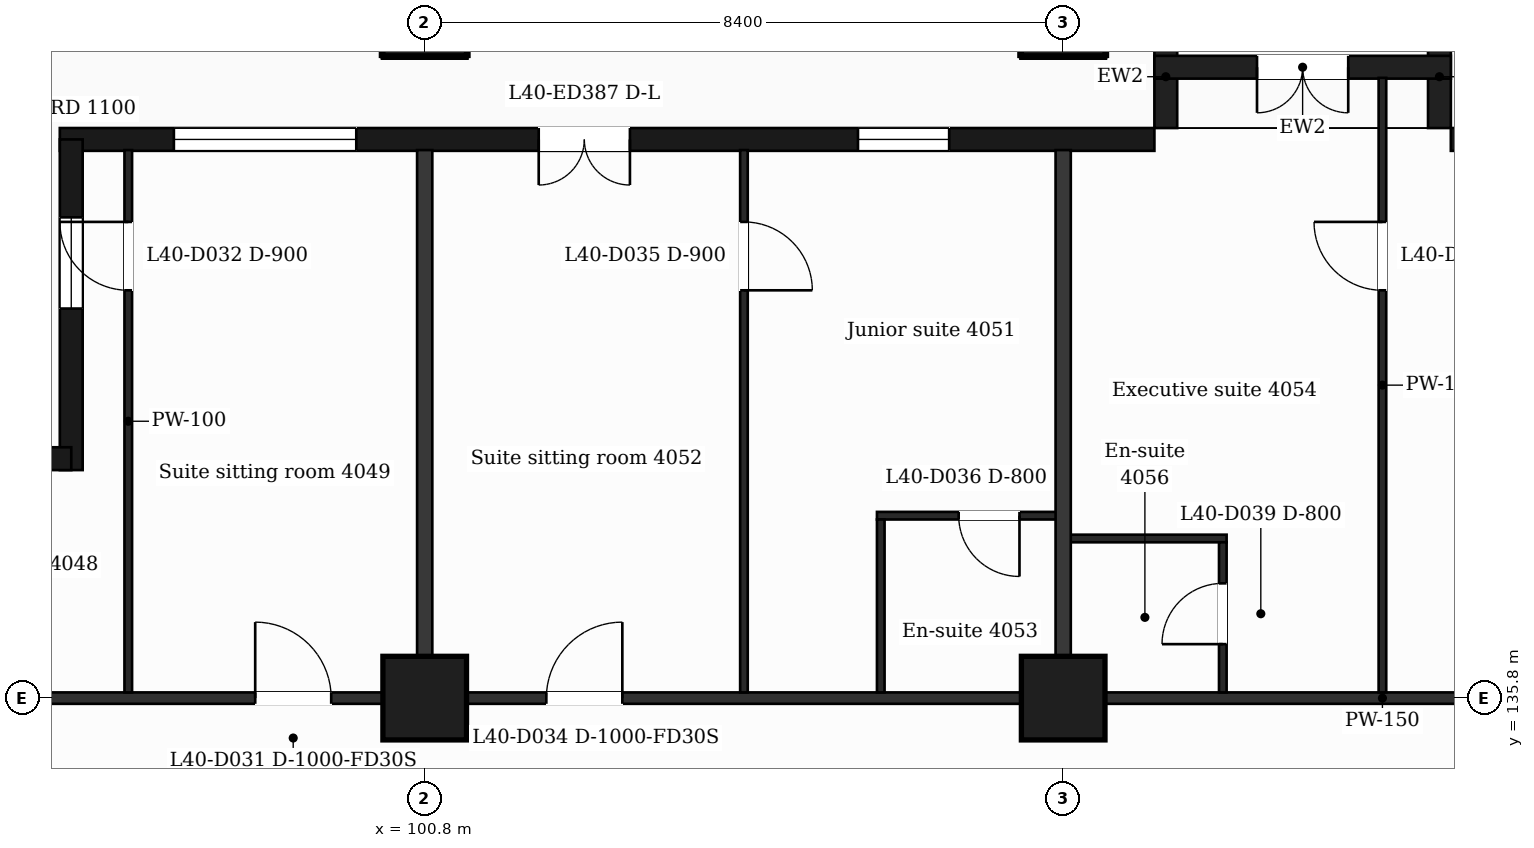
"""IFC4 building model, lengths in metres.
Left out: names, types, materials, properties, quantities, classifications, styles, units other than length and angle.
Written with IfcOpenShell. Run it as: python <this file> out.ifc"""

import sys

from ifc_helpers import new_model, si_unit, direction, frame, frame_2d, origin, origin_2d, place, context, subcontext, project, spatial, rectangle, extrude, element, fill, save


model = new_model("IFC4")
c1 = context("Model", 3, precision=1e-05, world=origin(), true_north=direction((0.0, 1.0)))
c2 = subcontext(c1, "Body", "Model", "MODEL_VIEW")
j1 = project(units=[si_unit("LENGTHUNIT", "METRE"), si_unit("PLANEANGLEUNIT", "RADIAN")], contexts=[c1])
p1 = place(None, origin())
s1 = spatial("IfcSite", under=j1, at=p1, CompositionType="ELEMENT")
p2 = place(p1, origin())
s2 = spatial("IfcBuilding", under=s1, at=p2, CompositionType="ELEMENT")
p3 = place(p2, frame((0.0, 0.0, 170.0)))
s3 = spatial("IfcBuildingStorey", under=s2, at=p3, CompositionType="ELEMENT", Elevation=170.0)
for number, where, z_axis, x_axis in (
    (1, (100.8, 135.8, 0.0), (0.0, 0.0, 1.0), (1.0, 0.0, 0.0)),
    (2, (109.2, 135.8, 0.0), (0.0, 0.0, 1.0), (1.0, 0.0, 0.0)),
    (3, (100.8, 144.8, 0.0), (0.0, 0.0, 1.0), (1.0, 0.0, 0.0)),
    (4, (109.2, 144.8, 0.0), (0.0, 0.0, 1.0), (1.0, 0.0, 0.0)),
):
    element("IfcColumn", number, at=place(p3, frame(where, z_axis=z_axis, x_axis=x_axis)), inside=s3, PredefinedType="COLUMN", context=c2, shape_type="SweptSolid", body=[
        extrude(rectangle(XDim=1.1, YDim=1.1, at=origin_2d()), origin(), (0.0, 0.0, 1.0), 3.7),
    ])
p4 = place(p3, frame((130.65, 143.15, 0.0), z_axis=(0.0, 0.0, 1.0), x_axis=(-1.0, 0.0, 0.0)))
e5 = element("IfcWall", 5, at=p4, inside=s3, PredefinedType="SOLIDWALL", context=c2, shape_type="SweptSolid", body=[
    extrude(rectangle(XDim=16.35, YDim=0.3, at=frame_2d((8.175, 0.0))), origin(), (0.0, 0.0, 1.0), 3.38),
])
p5 = place(p4, frame((1.35, 0.0, 0.9)))
e6 = element("IfcOpeningElement", 6, at=p5, cuts=e5, PredefinedType="OPENING", context=c2, shape_type="SweptSolid", body=[
    extrude(rectangle(XDim=2.4, YDim=2.1, at=frame_2d((1.2, 1.05))), frame((0.0, 0.16, 0.0), z_axis=(0.0, -1.0, 0.0), x_axis=(1.0, 0.0, 0.0)), (0.0, 0.0, 1.0), 0.32),
])
p6 = place(p4, frame((5.55, 0.0, 0.9)))
e7 = element("IfcOpeningElement", 7, at=p6, cuts=e5, PredefinedType="OPENING", context=c2, shape_type="SweptSolid", body=[
    extrude(rectangle(XDim=2.4, YDim=2.1, at=frame_2d((1.2, 1.05))), frame((0.0, 0.16, 0.0), z_axis=(0.0, -1.0, 0.0), x_axis=(1.0, 0.0, 0.0)), (0.0, 0.0, 1.0), 0.32),
])
p7 = place(p4, frame((9.45, 0.0, 0.0)))
e8 = element("IfcOpeningElement", 8, at=p7, cuts=e5, PredefinedType="OPENING", context=c2, shape_type="SweptSolid", body=[
    extrude(rectangle(XDim=1.2, YDim=2.4, at=frame_2d((0.6, 1.2))), frame((0.0, 0.16, 0.0), z_axis=(0.0, -1.0, 0.0), x_axis=(1.0, 0.0, 0.0)), (0.0, 0.0, 1.0), 0.32),
])
p8 = place(p4, frame((11.25, 0.0, 0.9)))
e9 = element("IfcOpeningElement", 9, at=p8, cuts=e5, PredefinedType="OPENING", context=c2, shape_type="SweptSolid", body=[
    extrude(rectangle(XDim=1.2, YDim=2.1, at=frame_2d((0.6, 1.05))), frame((0.0, 0.16, 0.0), z_axis=(0.0, -1.0, 0.0), x_axis=(1.0, 0.0, 0.0)), (0.0, 0.0, 1.0), 0.32),
])
p9 = place(p4, frame((13.45, 0.0, 0.9)))
e10 = element("IfcOpeningElement", 10, at=p9, cuts=e5, PredefinedType="OPENING", context=c2, shape_type="SweptSolid", body=[
    extrude(rectangle(XDim=2.4, YDim=2.1, at=frame_2d((1.2, 1.05))), frame((0.0, 0.16, 0.0), z_axis=(0.0, -1.0, 0.0), x_axis=(1.0, 0.0, 0.0)), (0.0, 0.0, 1.0), 0.32),
])
p10 = place(p3, frame((110.4, 143.15, 0.0), z_axis=(0.0, 0.0, 1.0), x_axis=(-1.0, 0.0, 0.0)))
e11 = element("IfcWall", 11, at=p10, inside=s3, PredefinedType="SOLIDWALL", context=c2, shape_type="SweptSolid", body=[
    extrude(rectangle(XDim=14.4, YDim=0.3, at=frame_2d((7.2, 0.0))), origin(), (0.0, 0.0, 1.0), 3.38),
])
p11 = place(p10, frame((2.7, 0.0, 0.9)))
e12 = element("IfcOpeningElement", 12, at=p11, cuts=e11, PredefinedType="OPENING", context=c2, shape_type="SweptSolid", body=[
    extrude(rectangle(XDim=1.2, YDim=2.1, at=frame_2d((0.6, 1.05))), frame((0.0, 0.16, 0.0), z_axis=(0.0, -1.0, 0.0), x_axis=(1.0, 0.0, 0.0)), (0.0, 0.0, 1.0), 0.32),
])
p12 = place(p10, frame((6.9, 0.0, 0.0)))
e13 = element("IfcOpeningElement", 13, at=p12, cuts=e11, PredefinedType="OPENING", context=c2, shape_type="SweptSolid", body=[
    extrude(rectangle(XDim=1.2, YDim=2.4, at=frame_2d((0.6, 1.2))), frame((0.0, 0.16, 0.0), z_axis=(0.0, -1.0, 0.0), x_axis=(1.0, 0.0, 0.0)), (0.0, 0.0, 1.0), 0.32),
])
p13 = place(p10, frame((10.5, 0.0, 0.9)))
e14 = element("IfcOpeningElement", 14, at=p13, cuts=e11, PredefinedType="OPENING", context=c2, shape_type="SweptSolid", body=[
    extrude(rectangle(XDim=2.4, YDim=2.1, at=frame_2d((1.2, 1.05))), frame((0.0, 0.16, 0.0), z_axis=(0.0, -1.0, 0.0), x_axis=(1.0, 0.0, 0.0)), (0.0, 0.0, 1.0), 0.32),
])
for number, where, z_axis, x_axis in (
    (15, (114.15, 143.3, 0.0), (0.0, 0.0, 1.0), (0.0, 1.0, 0.0)),
    (16, (110.55, 143.3, 0.0), (0.0, 0.0, 1.0), (0.0, 1.0, 0.0)),
):
    element("IfcWall", number, at=place(p3, frame(where, z_axis=z_axis, x_axis=x_axis)), inside=s3, PredefinedType="SOLIDWALL", context=c2, shape_type="SweptSolid", body=[
        extrude(rectangle(XDim=1.35, YDim=0.3, at=frame_2d((0.675, 0.0))), origin(), (0.0, 0.0, 1.0), 3.38),
    ])
p14 = place(p3, frame((114.3, 144.1, 0.0), z_axis=(0.0, 0.0, 1.0), x_axis=(-1.0, 0.0, 0.0)))
e17 = element("IfcWall", 17, at=p14, inside=s3, PredefinedType="SOLIDWALL", context=c2, shape_type="SweptSolid", body=[
    extrude(rectangle(XDim=3.9, YDim=0.3, at=frame_2d((1.95, 0.0))), origin(), (0.0, 0.0, 1.0), 3.38),
])
p15 = place(p14, frame((1.35, 0.0, 0.0)))
e18 = element("IfcOpeningElement", 18, at=p15, cuts=e17, PredefinedType="OPENING", context=c2, shape_type="SweptSolid", body=[
    extrude(rectangle(XDim=1.2, YDim=2.4, at=frame_2d((0.6, 1.2))), frame((0.0, 0.16, 0.0), z_axis=(0.0, -1.0, 0.0), x_axis=(1.0, 0.0, 0.0)), (0.0, 0.0, 1.0), 0.32),
])
p16 = place(p3, frame((96.15, 143.15, 0.0), z_axis=(0.0, 0.0, 1.0), x_axis=(0.0, -1.0, 0.0)))
e19 = element("IfcWall", 19, at=p16, inside=s3, PredefinedType="SOLIDWALL", context=c2, shape_type="SweptSolid", body=[
    extrude(rectangle(XDim=4.35, YDim=0.3, at=frame_2d((2.175, 0.0))), origin(), (0.0, 0.0, 1.0), 3.38),
])
p17 = place(p16, frame((1.025, 0.0, 0.9)))
e20 = element("IfcOpeningElement", 20, at=p17, cuts=e19, PredefinedType="OPENING", context=c2, shape_type="SweptSolid", body=[
    extrude(rectangle(XDim=1.2, YDim=2.1, at=frame_2d((0.6, 1.05))), frame((0.0, 0.16, 0.0), z_axis=(0.0, -1.0, 0.0), x_axis=(1.0, 0.0, 0.0)), (0.0, 0.0, 1.0), 0.32),
])
p18 = place(p3, frame((96.15, 138.95, 0.0), z_axis=(0.0, 0.0, 1.0), x_axis=(-1.0, 0.0, 0.0)))
e21 = element("IfcWall", 21, at=p18, inside=s3, PredefinedType="SOLIDWALL", context=c2, shape_type="SweptSolid", body=[
    extrude(rectangle(XDim=5.104, YDim=0.3, at=frame_2d((2.552, 0.0))), origin(), (0.0, 0.0, 1.0), 3.38),
])
p19 = place(p18, frame((0.725, 0.0, 0.9)))
e22 = element("IfcOpeningElement", 22, at=p19, cuts=e21, PredefinedType="OPENING", context=c2, shape_type="SweptSolid", body=[
    extrude(rectangle(XDim=2.4, YDim=2.1, at=frame_2d((1.2, 1.05))), frame((0.0, 0.16, 0.0), z_axis=(0.0, -1.0, 0.0), x_axis=(1.0, 0.0, 0.0)), (0.0, 0.0, 1.0), 0.32),
])
p20 = place(p3, frame((90.895, 135.8, 0.0), z_axis=(0.0, 0.0, 1.0), x_axis=(1.0, 0.0, 0.0)))
e23 = element("IfcWall", 23, at=p20, inside=s3, PredefinedType="PARTITIONING", context=c2, shape_type="SweptSolid", body=[
    extrude(rectangle(XDim=45.011, YDim=0.15, at=frame_2d((22.505, 0.0))), origin(), (0.0, 0.0, 1.0), 3.38),
])
p21 = place(p20, frame((7.675, 0.0, 0.0)))
e24 = element("IfcOpeningElement", 24, at=p21, cuts=e23, PredefinedType="OPENING", context=c2, shape_type="SweptSolid", body=[
    extrude(rectangle(XDim=1.0, YDim=2.1, at=frame_2d((0.5, 1.05))), frame((0.0, 0.085, 0.0), z_axis=(0.0, -1.0, 0.0), x_axis=(1.0, 0.0, 0.0)), (0.0, 0.0, 1.0), 0.17),
])
p22 = place(p20, frame((11.505, 0.0, 0.0)))
e25 = element("IfcOpeningElement", 25, at=p22, cuts=e23, PredefinedType="OPENING", context=c2, shape_type="SweptSolid", body=[
    extrude(rectangle(XDim=1.0, YDim=2.1, at=frame_2d((0.5, 1.05))), frame((0.0, 0.085, 0.0), z_axis=(0.0, -1.0, 0.0), x_axis=(1.0, 0.0, 0.0)), (0.0, 0.0, 1.0), 0.17),
])
p23 = place(p20, frame((24.865, 0.0, 0.0)))
e26 = element("IfcOpeningElement", 26, at=p23, cuts=e23, PredefinedType="OPENING", context=c2, shape_type="SweptSolid", body=[
    extrude(rectangle(XDim=1.0, YDim=2.1, at=frame_2d((0.5, 1.05))), frame((0.0, 0.085, 0.0), z_axis=(0.0, -1.0, 0.0), x_axis=(1.0, 0.0, 0.0)), (0.0, 0.0, 1.0), 0.17),
])
p24 = place(p20, frame((31.18, 0.0, 0.0)))
e27 = element("IfcOpeningElement", 27, at=p24, cuts=e23, PredefinedType="OPENING", context=c2, shape_type="SweptSolid", body=[
    extrude(rectangle(XDim=0.95, YDim=2.1, at=frame_2d((0.475, 1.05))), frame((0.0, 0.085, 0.0), z_axis=(0.0, -1.0, 0.0), x_axis=(1.0, 0.0, 0.0)), (0.0, 0.0, 1.0), 0.17),
])
p25 = place(p20, frame((39.814, 0.0, 0.0)))
e28 = element("IfcOpeningElement", 28, at=p25, cuts=e23, PredefinedType="OPENING", context=c2, shape_type="SweptSolid", body=[
    extrude(rectangle(XDim=0.95, YDim=2.1, at=frame_2d((0.475, 1.05))), frame((0.0, 0.085, 0.0), z_axis=(0.0, -1.0, 0.0), x_axis=(1.0, 0.0, 0.0)), (0.0, 0.0, 1.0), 0.17),
])
p26 = place(p3, frame((109.2, 137.9, 0.0), z_axis=(0.0, 0.0, 1.0), x_axis=(1.0, 0.0, 0.0)))
e29 = element("IfcWall", 29, at=p26, inside=s3, PredefinedType="PARTITIONING", context=c2, shape_type="SweptSolid", body=[
    extrude(rectangle(XDim=2.15, YDim=0.1, at=frame_2d((1.075, 0.0))), origin(), (0.0, 0.0, 1.0), 3.38),
])
p27 = place(p3, frame((106.75, 138.2, 0.0), z_axis=(0.0, 0.0, 1.0), x_axis=(1.0, 0.0, 0.0)))
e30 = element("IfcWall", 30, at=p27, inside=s3, PredefinedType="PARTITIONING", context=c2, shape_type="SweptSolid", body=[
    extrude(rectangle(XDim=2.45, YDim=0.1, at=frame_2d((1.225, 0.0))), origin(), (0.0, 0.0, 1.0), 3.38),
])
p28 = place(p27, frame((1.075, 0.0, 0.0)))
e31 = element("IfcOpeningElement", 31, at=p28, cuts=e30, PredefinedType="OPENING", context=c2, shape_type="SweptSolid", body=[
    extrude(rectangle(XDim=0.8, YDim=2.1, at=frame_2d((0.4, 1.05))), frame((0.0, 0.06, 0.0), z_axis=(0.0, -1.0, 0.0), x_axis=(1.0, 0.0, 0.0)), (0.0, 0.0, 1.0), 0.12),
])
p29 = place(p3, frame((96.9, 135.875, 0.0), z_axis=(0.0, 0.0, 1.0), x_axis=(0.0, 1.0, 0.0)))
e32 = element("IfcWall", 32, at=p29, inside=s3, PredefinedType="PARTITIONING", context=c2, shape_type="SweptSolid", body=[
    extrude(rectangle(XDim=7.135, YDim=0.1, at=frame_2d((3.567, 0.0))), origin(), (0.0, 0.0, 1.0), 3.38),
])
p30 = place(p29, frame((5.29, 0.0, 0.0)))
e33 = element("IfcOpeningElement", 33, at=p30, cuts=e32, PredefinedType="OPENING", context=c2, shape_type="SweptSolid", body=[
    extrude(rectangle(XDim=0.9, YDim=2.1, at=frame_2d((0.45, 1.05))), frame((0.0, 0.06, 0.0), z_axis=(0.0, -1.0, 0.0), x_axis=(1.0, 0.0, 0.0)), (0.0, 0.0, 1.0), 0.12),
])
p31 = place(p3, frame((100.8, 135.875, 0.0), z_axis=(0.0, 0.0, 1.0), x_axis=(0.0, 1.0, 0.0)))
e34 = element("IfcWall", 34, at=p31, inside=s3, PredefinedType="PARTITIONING", context=c2, shape_type="SweptSolid", body=[
    extrude(rectangle(XDim=7.135, YDim=0.2, at=frame_2d((3.567, 0.0))), origin(), (0.0, 0.0, 1.0), 3.38),
])
p32 = place(p3, frame((105.0, 135.875, 0.0), z_axis=(0.0, 0.0, 1.0), x_axis=(0.0, 1.0, 0.0)))
e35 = element("IfcWall", 35, at=p32, inside=s3, PredefinedType="PARTITIONING", context=c2, shape_type="SweptSolid", body=[
    extrude(rectangle(XDim=7.135, YDim=0.1, at=frame_2d((3.567, 0.0))), origin(), (0.0, 0.0, 1.0), 3.38),
])
p33 = place(p32, frame((5.29, 0.0, 0.0)))
e36 = element("IfcOpeningElement", 36, at=p33, cuts=e35, PredefinedType="OPENING", context=c2, shape_type="SweptSolid", body=[
    extrude(rectangle(XDim=0.9, YDim=2.1, at=frame_2d((0.45, 1.05))), frame((0.0, 0.06, 0.0), z_axis=(0.0, -1.0, 0.0), x_axis=(1.0, 0.0, 0.0)), (0.0, 0.0, 1.0), 0.12),
])
p34 = place(p3, frame((106.8, 135.875, 0.0), z_axis=(0.0, 0.0, 1.0), x_axis=(0.0, 1.0, 0.0)))
e37 = element("IfcWall", 37, at=p34, inside=s3, PredefinedType="PARTITIONING", context=c2, shape_type="SweptSolid", body=[
    extrude(rectangle(XDim=2.275, YDim=0.1, at=frame_2d((1.137, 0.0))), origin(), (0.0, 0.0, 1.0), 3.38),
])
p35 = place(p3, frame((109.2, 135.875, 0.0), z_axis=(0.0, 0.0, 1.0), x_axis=(0.0, 1.0, 0.0)))
e38 = element("IfcWall", 38, at=p35, inside=s3, PredefinedType="PARTITIONING", context=c2, shape_type="SweptSolid", body=[
    extrude(rectangle(XDim=7.135, YDim=0.2, at=frame_2d((3.567, 0.0))), origin(), (0.0, 0.0, 1.0), 3.38),
])
p36 = place(p3, frame((111.3, 135.875, 0.0), z_axis=(0.0, 0.0, 1.0), x_axis=(0.0, 1.0, 0.0)))
e39 = element("IfcWall", 39, at=p36, inside=s3, PredefinedType="PARTITIONING", context=c2, shape_type="SweptSolid", body=[
    extrude(rectangle(XDim=1.975, YDim=0.1, at=frame_2d((0.988, 0.0))), origin(), (0.0, 0.0, 1.0), 3.38),
])
p37 = place(p36, frame((0.635, 0.0, 0.0)))
e40 = element("IfcOpeningElement", 40, at=p37, cuts=e39, PredefinedType="OPENING", context=c2, shape_type="SweptSolid", body=[
    extrude(rectangle(XDim=0.8, YDim=2.1, at=frame_2d((0.4, 1.05))), frame((0.0, 0.06, 0.0), z_axis=(0.0, -1.0, 0.0), x_axis=(1.0, 0.0, 0.0)), (0.0, 0.0, 1.0), 0.12),
])
p38 = place(p3, frame((113.4, 135.875, 0.0), z_axis=(0.0, 0.0, 1.0), x_axis=(0.0, 1.0, 0.0)))
e41 = element("IfcWall", 41, at=p38, inside=s3, PredefinedType="PARTITIONING", context=c2, shape_type="SweptSolid", body=[
    extrude(rectangle(XDim=8.085, YDim=0.1, at=frame_2d((4.042, 0.0))), origin(), (0.0, 0.0, 1.0), 3.38),
])
p39 = place(p38, frame((5.29, 0.0, 0.0)))
e42 = element("IfcOpeningElement", 42, at=p39, cuts=e41, PredefinedType="OPENING", context=c2, shape_type="SweptSolid", body=[
    extrude(rectangle(XDim=0.9, YDim=2.1, at=frame_2d((0.45, 1.05))), frame((0.0, 0.06, 0.0), z_axis=(0.0, -1.0, 0.0), x_axis=(1.0, 0.0, 0.0)), (0.0, 0.0, 1.0), 0.12),
])
p40 = place(p11, origin())
e43 = element("IfcWindow", 43, at=p40, inside=s3, PartitioningType="SINGLE_PANEL", PredefinedType="WINDOW", context=c2, shape_type="SweptSolid", body=[
    extrude(rectangle(XDim=1.2, YDim=2.1, at=frame_2d((0.6, 1.05))), frame((0.0, 0.03, 0.0), z_axis=(0.0, -1.0, 0.0), x_axis=(1.0, 0.0, 0.0)), (0.0, 0.0, 1.0), 0.06),
])
fill(e12, e43)
p41 = place(p12, origin())
e44 = element("IfcDoor", 44, at=p41, inside=s3, OperationType="DOUBLE_DOOR_SINGLE_SWING", PredefinedType="DOOR", context=c2, shape_type="SweptSolid", body=[
    extrude(rectangle(XDim=1.2, YDim=2.4, at=frame_2d((0.6, 1.2))), frame((0.0, 0.025, 0.0), z_axis=(0.0, -1.0, 0.0), x_axis=(1.0, 0.0, 0.0)), (0.0, 0.0, 1.0), 0.05),
])
fill(e13, e44)
p42 = place(p13, origin())
e45 = element("IfcWindow", 45, at=p42, inside=s3, PartitioningType="SINGLE_PANEL", PredefinedType="WINDOW", context=c2, shape_type="SweptSolid", body=[
    extrude(rectangle(XDim=2.4, YDim=2.1, at=frame_2d((1.2, 1.05))), frame((0.0, 0.03, 0.0), z_axis=(0.0, -1.0, 0.0), x_axis=(1.0, 0.0, 0.0)), (0.0, 0.0, 1.0), 0.06),
])
fill(e14, e45)
p43 = place(p15, origin())
e46 = element("IfcDoor", 46, at=p43, inside=s3, OperationType="DOUBLE_DOOR_SINGLE_SWING", PredefinedType="DOOR", context=c2, shape_type="SweptSolid", body=[
    extrude(rectangle(XDim=1.2, YDim=2.4, at=frame_2d((0.6, 1.2))), frame((0.0, 0.025, 0.0), z_axis=(0.0, -1.0, 0.0), x_axis=(1.0, 0.0, 0.0)), (0.0, 0.0, 1.0), 0.05),
])
fill(e18, e46)
p44 = place(p17, origin())
e47 = element("IfcWindow", 47, at=p44, inside=s3, PartitioningType="SINGLE_PANEL", PredefinedType="WINDOW", context=c2, shape_type="SweptSolid", body=[
    extrude(rectangle(XDim=1.2, YDim=2.1, at=frame_2d((0.6, 1.05))), frame((0.0, 0.03, 0.0), z_axis=(0.0, -1.0, 0.0), x_axis=(1.0, 0.0, 0.0)), (0.0, 0.0, 1.0), 0.06),
])
fill(e20, e47)
p45 = place(p21, origin())
e48 = element("IfcDoor", 48, at=p45, inside=s3, OperationType="SINGLE_SWING_LEFT", PredefinedType="DOOR", context=c2, shape_type="SweptSolid", body=[
    extrude(rectangle(XDim=1.0, YDim=2.1, at=frame_2d((0.5, 1.05))), frame((0.0, 0.025, 0.0), z_axis=(0.0, -1.0, 0.0), x_axis=(1.0, 0.0, 0.0)), (0.0, 0.0, 1.0), 0.05),
])
fill(e24, e48)
p46 = place(p30, origin())
e49 = element("IfcDoor", 49, at=p46, inside=s3, OperationType="SINGLE_SWING_RIGHT", PredefinedType="DOOR", context=c2, shape_type="SweptSolid", body=[
    extrude(rectangle(XDim=0.9, YDim=2.1, at=frame_2d((0.45, 1.05))), frame((0.0, 0.025, 0.0), z_axis=(0.0, -1.0, 0.0), x_axis=(1.0, 0.0, 0.0)), (0.0, 0.0, 1.0), 0.05),
])
fill(e33, e49)
p47 = place(p22, origin())
e50 = element("IfcDoor", 50, at=p47, inside=s3, OperationType="SINGLE_SWING_RIGHT", PredefinedType="DOOR", context=c2, shape_type="SweptSolid", body=[
    extrude(rectangle(XDim=1.0, YDim=2.1, at=frame_2d((0.5, 1.05))), frame((0.0, 0.025, 0.0), z_axis=(0.0, -1.0, 0.0), x_axis=(1.0, 0.0, 0.0)), (0.0, 0.0, 1.0), 0.05),
])
fill(e25, e50)
p48 = place(p33, origin())
e51 = element("IfcDoor", 51, at=p48, inside=s3, OperationType="SINGLE_SWING_LEFT", PredefinedType="DOOR", context=c2, shape_type="SweptSolid", body=[
    extrude(rectangle(XDim=0.9, YDim=2.1, at=frame_2d((0.45, 1.05))), frame((0.0, 0.025, 0.0), z_axis=(0.0, -1.0, 0.0), x_axis=(1.0, 0.0, 0.0)), (0.0, 0.0, 1.0), 0.05),
])
fill(e36, e51)
p49 = place(p28, origin())
e52 = element("IfcDoor", 52, at=p49, inside=s3, OperationType="SINGLE_SWING_RIGHT", PredefinedType="DOOR", context=c2, shape_type="SweptSolid", body=[
    extrude(rectangle(XDim=0.8, YDim=2.1, at=frame_2d((0.4, 1.05))), frame((0.0, 0.025, 0.0), z_axis=(0.0, -1.0, 0.0), x_axis=(1.0, 0.0, 0.0)), (0.0, 0.0, 1.0), 0.05),
])
fill(e31, e52)
p50 = place(p39, origin())
e53 = element("IfcDoor", 53, at=p50, inside=s3, OperationType="SINGLE_SWING_RIGHT", PredefinedType="DOOR", context=c2, shape_type="SweptSolid", body=[
    extrude(rectangle(XDim=0.9, YDim=2.1, at=frame_2d((0.45, 1.05))), frame((0.0, 0.025, 0.0), z_axis=(0.0, -1.0, 0.0), x_axis=(1.0, 0.0, 0.0)), (0.0, 0.0, 1.0), 0.05),
])
fill(e42, e53)
p51 = place(p37, origin())
e54 = element("IfcDoor", 54, at=p51, inside=s3, OperationType="SINGLE_SWING_LEFT", PredefinedType="DOOR", context=c2, shape_type="SweptSolid", body=[
    extrude(rectangle(XDim=0.8, YDim=2.1, at=frame_2d((0.4, 1.05))), frame((0.0, 0.025, 0.0), z_axis=(0.0, -1.0, 0.0), x_axis=(1.0, 0.0, 0.0)), (0.0, 0.0, 1.0), 0.05),
])
fill(e40, e54)
save(model, sys.argv[1])
